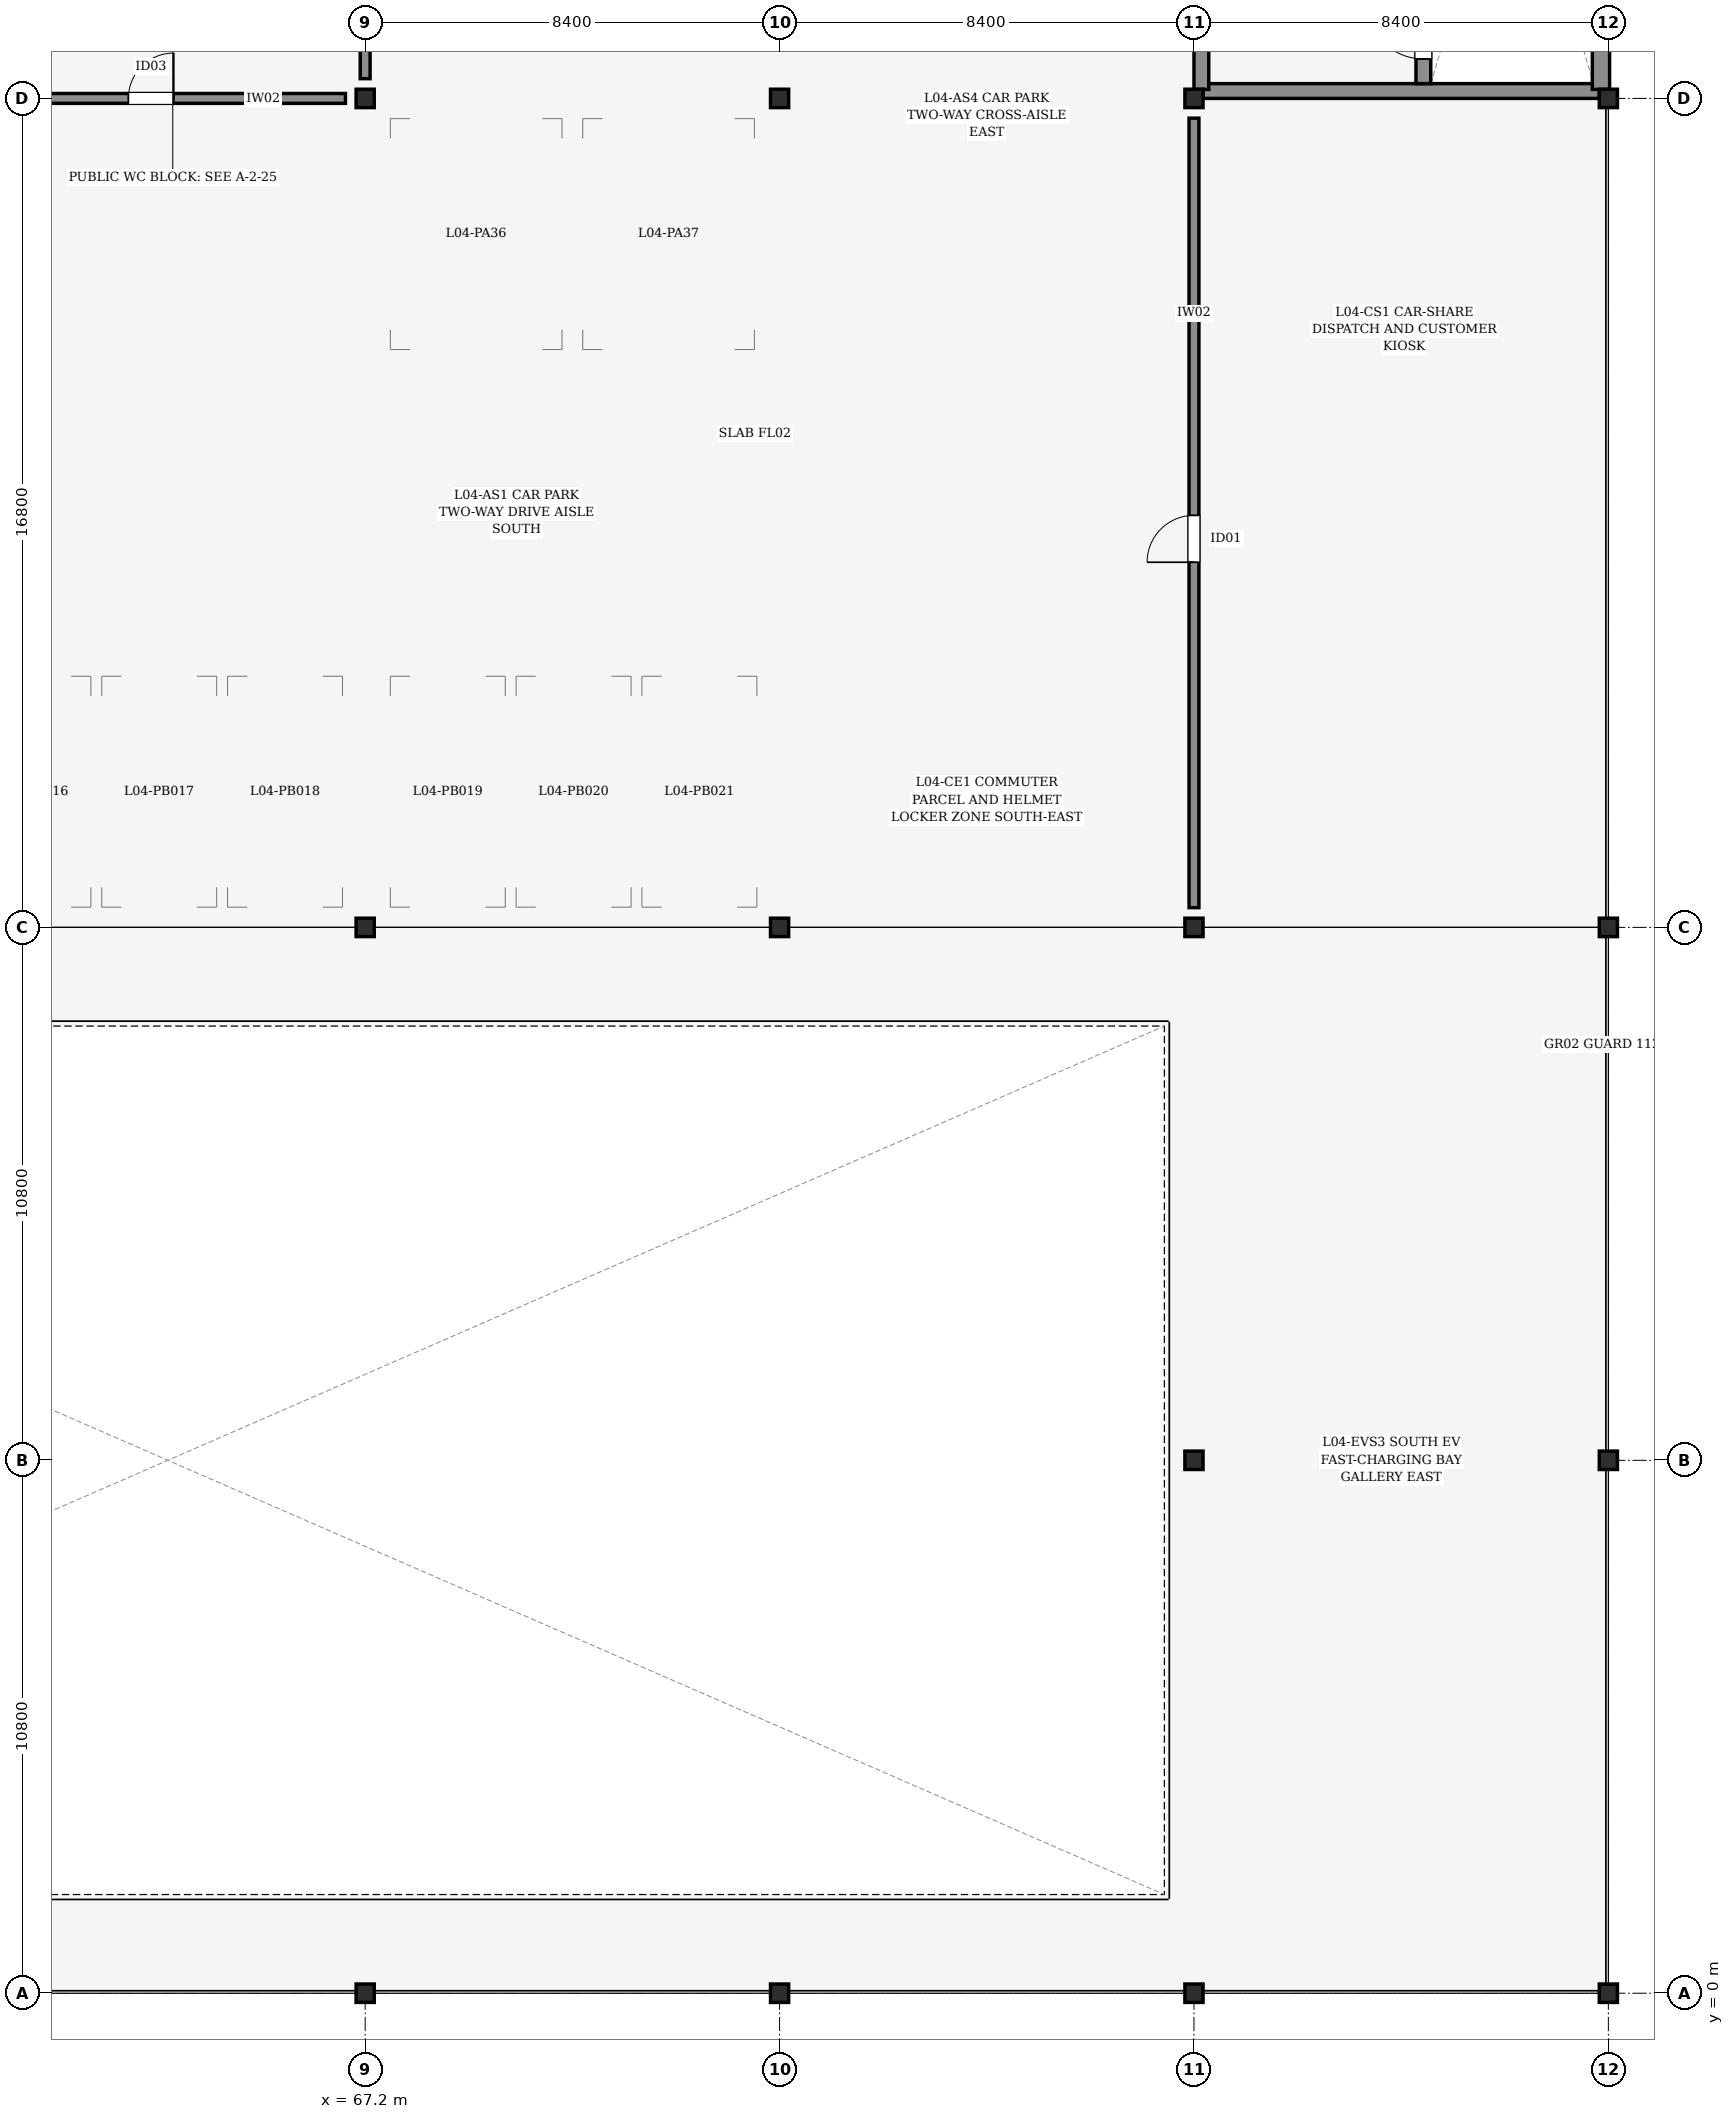
"""IFC4 building model, lengths in metres.
Left out: names, types, materials, properties, quantities, classifications, styles, units other than length and angle.
Written with IfcOpenShell. Run it as: python <this file> out.ifc"""

import sys

from ifc_helpers import new_model, si_unit, direction, frame, frame_2d, origin, origin_2d, place, context, subcontext, project, spatial, rectangle, i_section, extrude, element, fill, save


model = new_model("IFC4")
c1 = context("Model", 3, precision=1e-05, world=origin(), true_north=direction((0.0, 1.0)))
c2 = subcontext(c1, "Body", "Model", "MODEL_VIEW")
j1 = project(units=[si_unit("LENGTHUNIT", "METRE"), si_unit("PLANEANGLEUNIT", "RADIAN")], contexts=[c1])
p1 = place(None, origin())
s1 = spatial("IfcSite", under=j1, at=p1, CompositionType="ELEMENT")
p2 = place(p1, origin())
s2 = spatial("IfcBuilding", under=s1, at=p2, CompositionType="ELEMENT")
p3 = place(p2, frame((0.0, 0.0, 16.2)))
s3 = spatial("IfcBuildingStorey", under=s2, at=p3, CompositionType="ELEMENT", Elevation=16.2)
for number, where, z_axis, x_axis in (
    (1, (67.2, 0.0, 0.0), (0.0, 0.0, 1.0), (1.0, 0.0, 0.0)),
    (2, (67.2, 21.6, 0.0), (0.0, 0.0, 1.0), (1.0, 0.0, 0.0)),
    (3, (67.2, 38.4, 0.0), (0.0, 0.0, 1.0), (1.0, 0.0, 0.0)),
    (4, (75.6, 0.0, 0.0), (0.0, 0.0, 1.0), (1.0, 0.0, 0.0)),
    (5, (75.6, 21.6, 0.0), (0.0, 0.0, 1.0), (1.0, 0.0, 0.0)),
    (6, (75.6, 38.4, 0.0), (0.0, 0.0, 1.0), (1.0, 0.0, 0.0)),
    (7, (84.0, 0.0, 0.0), (0.0, 0.0, 1.0), (1.0, 0.0, 0.0)),
    (8, (84.0, 10.8, 0.0), (0.0, 0.0, 1.0), (1.0, 0.0, 0.0)),
    (9, (84.0, 21.6, 0.0), (0.0, 0.0, 1.0), (1.0, 0.0, 0.0)),
    (10, (84.0, 38.4, 0.0), (0.0, 0.0, 1.0), (1.0, 0.0, 0.0)),
    (11, (92.4, 0.0, 0.0), (0.0, 0.0, 1.0), (1.0, 0.0, 0.0)),
    (12, (92.4, 10.8, 0.0), (0.0, 0.0, 1.0), (1.0, 0.0, 0.0)),
    (13, (92.4, 21.6, 0.0), (0.0, 0.0, 1.0), (1.0, 0.0, 0.0)),
    (14, (92.4, 38.4, 0.0), (0.0, 0.0, 1.0), (1.0, 0.0, 0.0)),
):
    element("IfcColumn", number, at=place(p3, frame(where, z_axis=z_axis, x_axis=x_axis)), inside=s3, PredefinedType="COLUMN", context=c2, shape_type="SweptSolid", body=[
        extrude(i_section(OverallWidth=0.373, OverallDepth=0.368, WebThickness=0.014, FlangeThickness=0.024, FilletRadius=0.015, at=origin_2d()), origin(), (0.0, 0.0, 1.0), 3.6),
    ])
p4 = place(p3, frame((84.185, 38.55, 0.0), z_axis=(0.0, 0.0, 1.0), x_axis=(1.0, 0.0, 0.0)))
e15 = element("IfcWall", 15, at=p4, inside=s3, PredefinedType="SHEAR", context=c2, shape_type="SweptSolid", body=[
    extrude(rectangle(XDim=8.031, YDim=0.3, at=frame_2d((4.016, 0.0))), origin(), (0.0, 0.0, 1.0), 3.38),
])
p5 = place(p3, frame((92.25, 38.582, 0.0), z_axis=(0.0, 0.0, 1.0), x_axis=(0.0, 1.0, 0.0)))
e16 = element("IfcWall", 16, at=p5, inside=s3, PredefinedType="SHEAR", context=c2, shape_type="SweptSolid", body=[
    extrude(rectangle(XDim=16.436, YDim=0.35, at=frame_2d((8.218, 0.0))), origin(), (0.0, 0.0, 1.0), 3.38),
])
p6 = place(p3, frame((84.15, 38.582, 0.0), z_axis=(0.0, 0.0, 1.0), x_axis=(0.0, 1.0, 0.0)))
e17 = element("IfcWall", 17, at=p6, inside=s3, PredefinedType="SHEAR", context=c2, shape_type="SweptSolid", body=[
    extrude(rectangle(XDim=16.436, YDim=0.3, at=frame_2d((8.218, 0.0))), origin(), (0.0, 0.0, 1.0), 3.38),
])
p7 = place(p6, frame((5.668, 0.0, 0.0)))
e18 = element("IfcOpeningElement", 18, at=p7, cuts=e17, PredefinedType="OPENING", context=c2, shape_type="SweptSolid", body=[
    extrude(rectangle(XDim=1.25, YDim=2.15, at=frame_2d((0.625, 1.075))), frame((0.0, 0.16, 0.0), z_axis=(0.0, -1.0, 0.0), x_axis=(1.0, 0.0, 0.0)), (0.0, 0.0, 1.0), 0.32),
])
p8 = place(p3, frame((88.65, 38.7, 0.0), z_axis=(0.0, 0.0, 1.0), x_axis=(0.0, 1.0, 0.0)))
e19 = element("IfcWall", 19, at=p8, inside=s3, PredefinedType="SHEAR", context=c2, shape_type="SweptSolid", body=[
    extrude(rectangle(XDim=16.2, YDim=0.3, at=frame_2d((8.1, 0.0))), origin(), (0.0, 0.0, 1.0), 3.38),
])
p9 = place(p8, frame((0.5, 0.0, 0.0)))
e20 = element("IfcOpeningElement", 20, at=p9, cuts=e19, PredefinedType="OPENING", context=c2, shape_type="SweptSolid", body=[
    extrude(rectangle(XDim=1.15, YDim=2.15, at=frame_2d((0.575, 1.075))), frame((0.0, 0.16, 0.0), z_axis=(0.0, -1.0, 0.0), x_axis=(1.0, 0.0, 0.0)), (0.0, 0.0, 1.0), 0.32),
])
p10 = place(p3, frame((59.2, 38.4, 0.0), z_axis=(0.0, 0.0, 1.0), x_axis=(1.0, 0.0, 0.0)))
e21 = element("IfcWall", 21, at=p10, inside=s3, PredefinedType="PARTITIONING", context=c2, shape_type="SweptSolid", body=[
    extrude(rectangle(XDim=7.6, YDim=0.2, at=frame_2d((3.8, 0.0))), origin(), (0.0, 0.0, 1.0), 2.525),
])
p11 = place(p10, frame((3.2, 0.0, 0.0)))
e22 = element("IfcOpeningElement", 22, at=p11, cuts=e21, PredefinedType="OPENING", context=c2, shape_type="SweptSolid", body=[
    extrude(rectangle(XDim=0.92, YDim=2.1, at=frame_2d((0.46, 1.05))), frame((0.0, 0.11, 0.0), z_axis=(0.0, -1.0, 0.0), x_axis=(1.0, 0.0, 0.0)), (0.0, 0.0, 1.0), 0.22),
])
p12 = place(p3, frame((67.2, 38.8, 0.0), z_axis=(0.0, 0.0, 1.0), x_axis=(0.0, 1.0, 0.0)))
e23 = element("IfcWall", 23, at=p12, inside=s3, PredefinedType="PARTITIONING", context=c2, shape_type="SweptSolid", body=[
    extrude(rectangle(XDim=7.6, YDim=0.2, at=frame_2d((3.8, 0.0))), origin(), (0.0, 0.0, 1.0), 2.525),
])
p13 = place(p3, frame((84.0, 22.0, 0.0), z_axis=(0.0, 0.0, 1.0), x_axis=(0.0, 1.0, 0.0)))
e24 = element("IfcWall", 24, at=p13, inside=s3, PredefinedType="PARTITIONING", context=c2, shape_type="SweptSolid", body=[
    extrude(rectangle(XDim=16.0, YDim=0.2, at=frame_2d((8.0, 0.0))), origin(), (0.0, 0.0, 1.0), 2.525),
])
p14 = place(p13, frame((7.0, 0.0, 0.0)))
e25 = element("IfcOpeningElement", 25, at=p14, cuts=e24, PredefinedType="OPENING", context=c2, shape_type="SweptSolid", body=[
    extrude(rectangle(XDim=0.95, YDim=2.1, at=frame_2d((0.475, 1.05))), frame((0.0, 0.11, 0.0), z_axis=(0.0, -1.0, 0.0), x_axis=(1.0, 0.0, 0.0)), (0.0, 0.0, 1.0), 0.22),
])
p15 = place(p9, origin())
e26 = element("IfcDoor", 26, at=p15, inside=s3, OperationType="SINGLE_SWING_RIGHT", PredefinedType="DOOR", context=c2, shape_type="SweptSolid", body=[
    extrude(rectangle(XDim=1.15, YDim=2.15, at=frame_2d((0.575, 1.075))), frame((0.0, 0.025, 0.0), z_axis=(0.0, -1.0, 0.0), x_axis=(1.0, 0.0, 0.0)), (0.0, 0.0, 1.0), 0.05),
])
fill(e20, e26)
p16 = place(p11, origin())
e27 = element("IfcDoor", 27, at=p16, inside=s3, OperationType="SINGLE_SWING_RIGHT", PredefinedType="DOOR", context=c2, shape_type="SweptSolid", body=[
    extrude(rectangle(XDim=0.92, YDim=2.1, at=frame_2d((0.46, 1.05))), frame((0.0, 0.025, 0.0), z_axis=(0.0, -1.0, 0.0), x_axis=(1.0, 0.0, 0.0)), (0.0, 0.0, 1.0), 0.05),
])
fill(e22, e27)
p17 = place(p14, origin())
e28 = element("IfcDoor", 28, at=p17, inside=s3, OperationType="SINGLE_SWING_LEFT", PredefinedType="DOOR", context=c2, shape_type="SweptSolid", body=[
    extrude(rectangle(XDim=0.95, YDim=2.1, at=frame_2d((0.475, 1.05))), frame((0.0, 0.025, 0.0), z_axis=(0.0, -1.0, 0.0), x_axis=(1.0, 0.0, 0.0)), (0.0, 0.0, 1.0), 0.05),
])
fill(e25, e28)
save(model, sys.argv[1])
